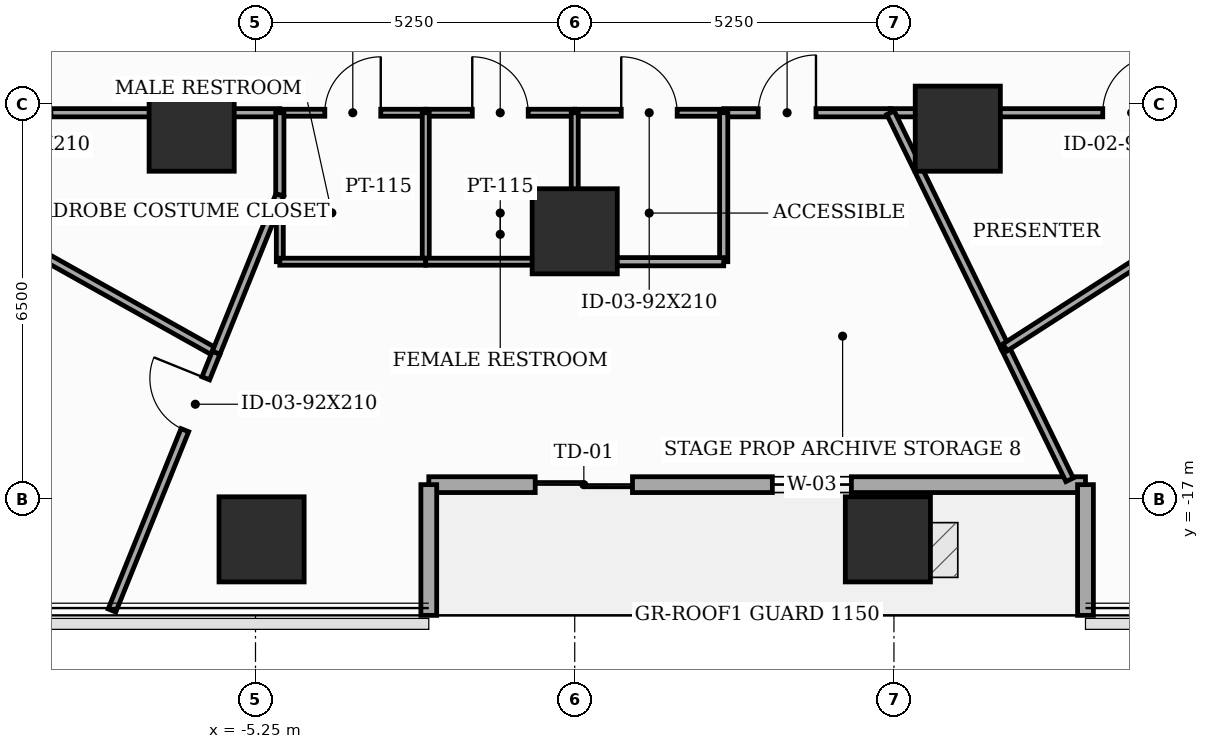
"""IFC4 building model, lengths in metres.
Left out: names, types, materials, properties, quantities, classifications, styles, units other than length and angle.
Written with IfcOpenShell. Run it as: python <this file> out.ifc"""

import sys

from ifc_helpers import new_model, si_unit, direction, frame, frame_2d, origin, origin_2d, place, context, subcontext, project, spatial, rectangle, extrude, element, fill, save


model = new_model("IFC4")
c1 = context("Model", 3, precision=1e-05, world=origin(), true_north=direction((0.0, 1.0)))
c2 = subcontext(c1, "Body", "Model", "MODEL_VIEW")
j1 = project(units=[si_unit("LENGTHUNIT", "METRE"), si_unit("PLANEANGLEUNIT", "RADIAN")], contexts=[c1])
p1 = place(None, origin())
s1 = spatial("IfcSite", under=j1, at=p1, CompositionType="ELEMENT")
p2 = place(p1, origin())
s2 = spatial("IfcBuilding", under=s1, at=p2, CompositionType="ELEMENT")
p3 = place(p2, frame((0.0, 0.0, 44.5)))
s3 = spatial("IfcBuildingStorey", under=s2, at=p3, CompositionType="ELEMENT", Elevation=44.5)
for number, where, z_axis, x_axis in (
    (1, (-6.3, -10.912, 0.0), (0.0, 0.0, 1.0), (1.0, 0.0, 0.0)),
    (2, (0.0, -12.6, 0.0), (0.0, 0.0, 1.0), (1.0, 0.0, 0.0)),
    (3, (6.3, -10.912, 0.0), (0.0, 0.0, 1.0), (1.0, 0.0, 0.0)),
    (4, (-5.15, -17.667, 0.0), (0.0, 0.0, 1.0), (1.0, 0.0, 0.0)),
    (5, (5.15, -17.667, 0.0), (0.0, 0.0, 1.0), (1.0, 0.0, 0.0)),
):
    element("IfcColumn", number, at=place(p3, frame(where, z_axis=z_axis, x_axis=x_axis)), inside=s3, PredefinedType="COLUMN", context=c2, shape_type="SweptSolid", body=[
        extrude(rectangle(XDim=1.4, YDim=1.4, at=origin_2d()), origin(), (0.0, 0.0, 1.0), 3.7),
    ])
p4 = place(p3, frame((-2.4, -16.767, 0.0), z_axis=(0.0, 0.0, 1.0), x_axis=(1.0, 0.0, 0.0)))
e6 = element("IfcWall", 6, at=p4, inside=s3, PredefinedType="SOLIDWALL", context=c2, shape_type="SweptSolid", body=[
    extrude(rectangle(XDim=10.8, YDim=0.26, at=frame_2d((5.4, 0.0))), origin(), (0.0, 0.0, 1.0), 3.5),
])
p5 = place(p4, frame((1.75, 0.0, 0.0)))
e7 = element("IfcOpeningElement", 7, at=p5, cuts=e6, PredefinedType="OPENING", context=c2, shape_type="SweptSolid", body=[
    extrude(rectangle(XDim=1.6, YDim=2.08, at=frame_2d((0.8, 1.04))), frame((0.0, 0.14, 0.0), z_axis=(0.0, -1.0, 0.0), x_axis=(1.0, 0.0, 0.0)), (0.0, 0.0, 1.0), 0.28),
])
p6 = place(p4, frame((5.65, 0.0, 0.85)))
e8 = element("IfcOpeningElement", 8, at=p6, cuts=e6, PredefinedType="OPENING", context=c2, shape_type="SweptSolid", body=[
    extrude(rectangle(XDim=1.3, YDim=1.25, at=frame_2d((0.65, 0.625))), frame((0.0, 0.14, 0.0), z_axis=(0.0, -1.0, 0.0), x_axis=(1.0, 0.0, 0.0)), (0.0, 0.0, 1.0), 0.28),
])
for number, where, z_axis, x_axis in (
    (9, (-2.4, -18.917, 0.0), (0.0, 0.0, 1.0), (0.0, 1.0, 0.0)),
    (10, (8.4, -16.767, 0.0), (0.0, 0.0, 1.0), (0.0, -1.0, 0.0)),
):
    element("IfcWall", number, at=place(p3, frame(where, z_axis=z_axis, x_axis=x_axis)), inside=s3, PredefinedType="SOLIDWALL", context=c2, shape_type="SweptSolid", body=[
        extrude(rectangle(XDim=2.15, YDim=0.26, at=frame_2d((1.075, 0.0))), origin(), (0.0, 0.0, 1.0), 3.5),
    ])
p7 = place(p3, frame((-10.15, -10.65, 0.0), z_axis=(0.0, 0.0, 1.0), x_axis=(1.0, 0.0, 0.0)))
e11 = element("IfcWall", 11, at=p7, inside=s3, PredefinedType="PARTITIONING", context=c2, shape_type="SweptSolid", body=[
    extrude(rectangle(XDim=5.3, YDim=0.135, at=frame_2d((2.65, 0.0))), origin(), (0.0, 0.0, 1.0), 2.785),
])
p8 = place(p7, frame((0.585, 0.0, 0.0)))
e12 = element("IfcOpeningElement", 12, at=p8, cuts=e11, PredefinedType="OPENING", context=c2, shape_type="SweptSolid", body=[
    extrude(rectangle(XDim=0.95, YDim=2.1, at=frame_2d((0.475, 1.05))), frame((0.0, 0.077, 0.0), z_axis=(0.0, -1.0, 0.0), x_axis=(1.0, 0.0, 0.0)), (0.0, 0.0, 1.0), 0.155),
])
p9 = place(p3, frame((-4.85, -10.65, 0.0), z_axis=(0.0, 0.0, 1.0), x_axis=(1.0, 0.0, 0.0)))
e13 = element("IfcWall", 13, at=p9, inside=s3, PredefinedType="PARTITIONING", context=c2, shape_type="SweptSolid", body=[
    extrude(rectangle(XDim=2.4, YDim=0.115, at=frame_2d((1.2, 0.0))), origin(), (0.0, 0.0, 1.0), 3.5),
])
p10 = place(p9, frame((0.74, 0.0, 0.0)))
e14 = element("IfcOpeningElement", 14, at=p10, cuts=e13, PredefinedType="OPENING", context=c2, shape_type="SweptSolid", body=[
    extrude(rectangle(XDim=0.92, YDim=2.1, at=frame_2d((0.46, 1.05))), frame((0.0, 0.067, 0.0), z_axis=(0.0, -1.0, 0.0), x_axis=(1.0, 0.0, 0.0)), (0.0, 0.0, 1.0), 0.135),
])
p11 = place(p3, frame((-2.45, -10.65, 0.0), z_axis=(0.0, 0.0, 1.0), x_axis=(1.0, 0.0, 0.0)))
e15 = element("IfcWall", 15, at=p11, inside=s3, PredefinedType="PARTITIONING", context=c2, shape_type="SweptSolid", body=[
    extrude(rectangle(XDim=2.45, YDim=0.115, at=frame_2d((1.225, 0.0))), origin(), (0.0, 0.0, 1.0), 2.785),
])
p12 = place(p11, frame((0.765, 0.0, 0.0)))
e16 = element("IfcOpeningElement", 16, at=p12, cuts=e15, PredefinedType="OPENING", context=c2, shape_type="SweptSolid", body=[
    extrude(rectangle(XDim=0.92, YDim=2.1, at=frame_2d((0.46, 1.05))), frame((0.0, 0.067, 0.0), z_axis=(0.0, -1.0, 0.0), x_axis=(1.0, 0.0, 0.0)), (0.0, 0.0, 1.0), 0.135),
])
p13 = place(p3, frame((2.45, -10.65, 0.0), z_axis=(0.0, 0.0, 1.0), x_axis=(1.0, 0.0, 0.0)))
e17 = element("IfcWall", 17, at=p13, inside=s3, PredefinedType="PARTITIONING", context=c2, shape_type="SweptSolid", body=[
    extrude(rectangle(XDim=2.744, YDim=0.135, at=frame_2d((1.372, 0.0))), origin(), (0.0, 0.0, 1.0), 3.5),
])
p14 = place(p13, frame((0.568, 0.0, 0.0)))
e18 = element("IfcOpeningElement", 18, at=p14, cuts=e17, PredefinedType="OPENING", context=c2, shape_type="SweptSolid", body=[
    extrude(rectangle(XDim=0.95, YDim=2.1, at=frame_2d((0.475, 1.05))), frame((0.0, 0.077, 0.0), z_axis=(0.0, -1.0, 0.0), x_axis=(1.0, 0.0, 0.0)), (0.0, 0.0, 1.0), 0.155),
])
p15 = place(p3, frame((0.0, -10.65, 0.0), z_axis=(0.0, 0.0, 1.0), x_axis=(1.0, 0.0, 0.0)))
e19 = element("IfcWall", 19, at=p15, inside=s3, PredefinedType="PARTITIONING", context=c2, shape_type="SweptSolid", body=[
    extrude(rectangle(XDim=2.45, YDim=0.115, at=frame_2d((1.225, 0.0))), origin(), (0.0, 0.0, 1.0), 3.5),
])
p16 = place(p15, frame((0.765, 0.0, 0.0)))
e20 = element("IfcOpeningElement", 20, at=p16, cuts=e19, PredefinedType="OPENING", context=c2, shape_type="SweptSolid", body=[
    extrude(rectangle(XDim=0.92, YDim=2.1, at=frame_2d((0.46, 1.05))), frame((0.0, 0.067, 0.0), z_axis=(0.0, -1.0, 0.0), x_axis=(1.0, 0.0, 0.0)), (0.0, 0.0, 1.0), 0.135),
])
p17 = place(p3, frame((5.194, -10.65, 0.0), z_axis=(0.0, 0.0, 1.0), x_axis=(1.0, 0.0, 0.0)))
e21 = element("IfcWall", 21, at=p17, inside=s3, PredefinedType="PARTITIONING", context=c2, shape_type="SweptSolid", body=[
    extrude(rectangle(XDim=4.956, YDim=0.135, at=frame_2d((2.478, 0.0))), origin(), (0.0, 0.0, 1.0), 2.785),
])
p18 = place(p17, frame((3.49, 0.0, 0.0)))
e22 = element("IfcOpeningElement", 22, at=p18, cuts=e21, PredefinedType="OPENING", context=c2, shape_type="SweptSolid", body=[
    extrude(rectangle(XDim=0.95, YDim=2.1, at=frame_2d((0.475, 1.05))), frame((0.0, 0.077, 0.0), z_axis=(0.0, -1.0, 0.0), x_axis=(1.0, 0.0, 0.0)), (0.0, 0.0, 1.0), 0.155),
])
p19 = place(p3, frame((-5.897, -14.596, 0.0), z_axis=(0.0, 0.0, 1.0), x_axis=(-0.87248894478, 0.488633851915, 0.0)))
e23 = element("IfcWall", 23, at=p19, inside=s3, PredefinedType="PARTITIONING", context=c2, shape_type="SweptSolid", body=[
    extrude(rectangle(XDim=4.39, YDim=0.135, at=frame_2d((2.195, 0.0))), origin(), (0.0, 0.0, 1.0), 2.685),
])
p20 = place(p3, frame((-7.61, -18.837, 0.0), z_axis=(0.0, 0.0, 1.0), x_axis=(0.374545124537, 0.927208687236, 0.0)))
e24 = element("IfcWall", 24, at=p20, inside=s3, PredefinedType="PARTITIONING", context=c2, shape_type="SweptSolid", body=[
    extrude(rectangle(XDim=4.574, YDim=0.135, at=frame_2d((2.287, 0.0))), origin(), (0.0, 0.0, 1.0), 2.685),
])
p21 = place(p20, frame((3.199, 0.0, 0.0)))
e25 = element("IfcOpeningElement", 25, at=p21, cuts=e24, PredefinedType="OPENING", context=c2, shape_type="SweptSolid", body=[
    extrude(rectangle(XDim=0.92, YDim=2.1, at=frame_2d((0.46, 1.05))), frame((0.0, 0.077, 0.0), z_axis=(0.0, -1.0, 0.0), x_axis=(1.0, 0.0, 0.0)), (0.0, 0.0, 1.0), 0.155),
])
p22 = place(p3, frame((-4.85, -12.004, 0.0), z_axis=(0.0, 0.0, 1.0), x_axis=(0.0, 1.0, 0.0)))
e26 = element("IfcWall", 26, at=p22, inside=s3, PredefinedType="PARTITIONING", context=c2, shape_type="SweptSolid", body=[
    extrude(rectangle(XDim=1.354, YDim=0.135, at=frame_2d((0.677, 0.0))), origin(), (0.0, 0.0, 1.0), 2.785),
])
p23 = place(p3, frame((-5.897, -14.596, 0.0), z_axis=(0.0, 0.0, 1.0), x_axis=(0.374490485533, 0.92723075674, 0.0)))
e27 = element("IfcWall", 27, at=p23, inside=s3, PredefinedType="PARTITIONING", context=c2, shape_type="SweptSolid", body=[
    extrude(rectangle(XDim=2.795, YDim=0.135, at=frame_2d((1.398, 0.0))), origin(), (0.0, 0.0, 1.0), 2.685),
])
p24 = place(p3, frame((-2.45, -13.1, 0.0), z_axis=(0.0, 0.0, 1.0), x_axis=(0.0, 1.0, 0.0)))
e28 = element("IfcWall", 28, at=p24, inside=s3, PredefinedType="PARTITIONING", context=c2, shape_type="SweptSolid", body=[
    extrude(rectangle(XDim=2.45, YDim=0.115, at=frame_2d((1.225, 0.0))), origin(), (0.0, 0.0, 1.0), 2.785),
])
p25 = place(p3, frame((-4.85, -12.298, 0.0), z_axis=(0.0, 0.0, 1.0), x_axis=(0.0, -1.0, 0.0)))
e29 = element("IfcWall", 29, at=p25, inside=s3, PredefinedType="PARTITIONING", context=c2, shape_type="SweptSolid", body=[
    extrude(rectangle(XDim=0.802, YDim=0.115, at=frame_2d((0.401, 0.0))), origin(), (0.0, 0.0, 1.0), 3.5),
])
p26 = place(p3, frame((-4.85, -13.1, 0.0), z_axis=(0.0, 0.0, 1.0), x_axis=(1.0, 0.0, 0.0)))
e30 = element("IfcWall", 30, at=p26, inside=s3, PredefinedType="PARTITIONING", context=c2, shape_type="SweptSolid", body=[
    extrude(rectangle(XDim=2.4, YDim=0.115, at=frame_2d((1.2, 0.0))), origin(), (0.0, 0.0, 1.0), 3.5),
])
p27 = place(p3, frame((-2.45, -13.1, 0.0), z_axis=(0.0, 0.0, 1.0), x_axis=(1.0, 0.0, 0.0)))
e31 = element("IfcWall", 31, at=p27, inside=s3, PredefinedType="PARTITIONING", context=c2, shape_type="SweptSolid", body=[
    extrude(rectangle(XDim=2.45, YDim=0.115, at=frame_2d((1.225, 0.0))), origin(), (0.0, 0.0, 1.0), 3.5),
])
p28 = place(p3, frame((0.0, -13.1, 0.0), z_axis=(0.0, 0.0, 1.0), x_axis=(0.0, 1.0, 0.0)))
e32 = element("IfcWall", 32, at=p28, inside=s3, PredefinedType="PARTITIONING", context=c2, shape_type="SweptSolid", body=[
    extrude(rectangle(XDim=2.45, YDim=0.115, at=frame_2d((1.225, 0.0))), origin(), (0.0, 0.0, 1.0), 2.785),
])
p29 = place(p3, frame((2.45, -10.65, 0.0), z_axis=(0.0, 0.0, 1.0), x_axis=(0.0, -1.0, 0.0)))
e33 = element("IfcWall", 33, at=p29, inside=s3, PredefinedType="PARTITIONING", context=c2, shape_type="SweptSolid", body=[
    extrude(rectangle(XDim=2.45, YDim=0.135, at=frame_2d((1.225, 0.0))), origin(), (0.0, 0.0, 1.0), 2.785),
])
p30 = place(p3, frame((2.45, -13.1, 0.0), z_axis=(0.0, 0.0, 1.0), x_axis=(-1.0, 0.0, 0.0)))
e34 = element("IfcWall", 34, at=p30, inside=s3, PredefinedType="PARTITIONING", context=c2, shape_type="SweptSolid", body=[
    extrude(rectangle(XDim=2.45, YDim=0.135, at=frame_2d((1.225, 0.0))), origin(), (0.0, 0.0, 1.0), 3.5),
])
p31 = place(p3, frame((7.077, -14.51, 0.0), z_axis=(0.0, 0.0, 1.0), x_axis=(-0.438392272504, 0.898783742292, 0.0)))
e35 = element("IfcWall", 35, at=p31, inside=s3, PredefinedType="PARTITIONING", context=c2, shape_type="SweptSolid", body=[
    extrude(rectangle(XDim=4.295, YDim=0.135, at=frame_2d((2.147, 0.0))), origin(), (0.0, 0.0, 1.0), 2.685),
])
p32 = place(p3, frame((8.138, -16.687, 0.0), z_axis=(0.0, 0.0, 1.0), x_axis=(-0.438320348892, 0.898818820312, 0.0)))
e36 = element("IfcWall", 36, at=p32, inside=s3, PredefinedType="PARTITIONING", context=c2, shape_type="SweptSolid", body=[
    extrude(rectangle(XDim=2.422, YDim=0.135, at=frame_2d((1.211, 0.0))), origin(), (0.0, 0.0, 1.0), 3.085),
])
p33 = place(p3, frame((7.077, -14.51, 0.0), z_axis=(0.0, 0.0, 1.0), x_axis=(0.841056333741, 0.540947542258, 0.0)))
e37 = element("IfcWall", 37, at=p33, inside=s3, PredefinedType="PARTITIONING", context=c2, shape_type="SweptSolid", body=[
    extrude(rectangle(XDim=4.222, YDim=0.135, at=frame_2d((2.111, 0.0))), origin(), (0.0, 0.0, 1.0), 2.685),
])
p34 = place(p5, frame((1.6, 0.0, 0.0), z_axis=(0.0, 0.0, 1.0), x_axis=(-1.0, 0.0, 0.0)))
e38 = element("IfcDoor", 38, at=p34, inside=s3, OperationType="DOUBLE_DOOR_SLIDING", PredefinedType="DOOR", context=c2, shape_type="SweptSolid", body=[
    extrude(rectangle(XDim=1.6, YDim=2.08, at=frame_2d((0.8, 1.04))), frame((0.0, 0.025, 0.0), z_axis=(0.0, -1.0, 0.0), x_axis=(1.0, 0.0, 0.0)), (0.0, 0.0, 1.0), 0.05),
])
fill(e7, e38)
p35 = place(p6, origin())
e39 = element("IfcWindow", 39, at=p35, inside=s3, PartitioningType="SINGLE_PANEL", PredefinedType="WINDOW", context=c2, shape_type="SweptSolid", body=[
    extrude(rectangle(XDim=1.3, YDim=1.25, at=frame_2d((0.65, 0.625))), frame((0.0, 0.03, 0.0), z_axis=(0.0, -1.0, 0.0), x_axis=(1.0, 0.0, 0.0)), (0.0, 0.0, 1.0), 0.06),
])
fill(e8, e39)
p36 = place(p10, origin())
e40 = element("IfcDoor", 40, at=p36, inside=s3, OperationType="SINGLE_SWING_RIGHT", PredefinedType="DOOR", context=c2, shape_type="SweptSolid", body=[
    extrude(rectangle(XDim=0.92, YDim=2.1, at=frame_2d((0.46, 1.05))), frame((0.0, 0.025, 0.0), z_axis=(0.0, -1.0, 0.0), x_axis=(1.0, 0.0, 0.0)), (0.0, 0.0, 1.0), 0.05),
])
fill(e14, e40)
p37 = place(p12, origin())
e41 = element("IfcDoor", 41, at=p37, inside=s3, OperationType="SINGLE_SWING_LEFT", PredefinedType="DOOR", context=c2, shape_type="SweptSolid", body=[
    extrude(rectangle(XDim=0.92, YDim=2.1, at=frame_2d((0.46, 1.05))), frame((0.0, 0.025, 0.0), z_axis=(0.0, -1.0, 0.0), x_axis=(1.0, 0.0, 0.0)), (0.0, 0.0, 1.0), 0.05),
])
fill(e16, e41)
p38 = place(p14, origin())
e42 = element("IfcDoor", 42, at=p38, inside=s3, OperationType="SINGLE_SWING_RIGHT", PredefinedType="DOOR", context=c2, shape_type="SweptSolid", body=[
    extrude(rectangle(XDim=0.95, YDim=2.1, at=frame_2d((0.475, 1.05))), frame((0.0, 0.025, 0.0), z_axis=(0.0, -1.0, 0.0), x_axis=(1.0, 0.0, 0.0)), (0.0, 0.0, 1.0), 0.05),
])
fill(e18, e42)
p39 = place(p16, origin())
e43 = element("IfcDoor", 43, at=p39, inside=s3, OperationType="SINGLE_SWING_LEFT", PredefinedType="DOOR", context=c2, shape_type="SweptSolid", body=[
    extrude(rectangle(XDim=0.92, YDim=2.1, at=frame_2d((0.46, 1.05))), frame((0.0, 0.025, 0.0), z_axis=(0.0, -1.0, 0.0), x_axis=(1.0, 0.0, 0.0)), (0.0, 0.0, 1.0), 0.05),
])
fill(e20, e43)
p40 = place(p18, origin())
e44 = element("IfcDoor", 44, at=p40, inside=s3, OperationType="SINGLE_SWING_RIGHT", PredefinedType="DOOR", context=c2, shape_type="SweptSolid", body=[
    extrude(rectangle(XDim=0.95, YDim=2.1, at=frame_2d((0.475, 1.05))), frame((0.0, 0.025, 0.0), z_axis=(0.0, -1.0, 0.0), x_axis=(1.0, 0.0, 0.0)), (0.0, 0.0, 1.0), 0.05),
])
fill(e22, e44)
p41 = place(p21, origin())
e45 = element("IfcDoor", 45, at=p41, inside=s3, OperationType="SINGLE_SWING_RIGHT", PredefinedType="DOOR", context=c2, shape_type="SweptSolid", body=[
    extrude(rectangle(XDim=0.92, YDim=2.1, at=frame_2d((0.46, 1.05))), frame((0.0, 0.025, 0.0), z_axis=(0.0, -1.0, 0.0), x_axis=(1.0, 0.0, 0.0)), (0.0, 0.0, 1.0), 0.05),
])
fill(e25, e45)
save(model, sys.argv[1])
